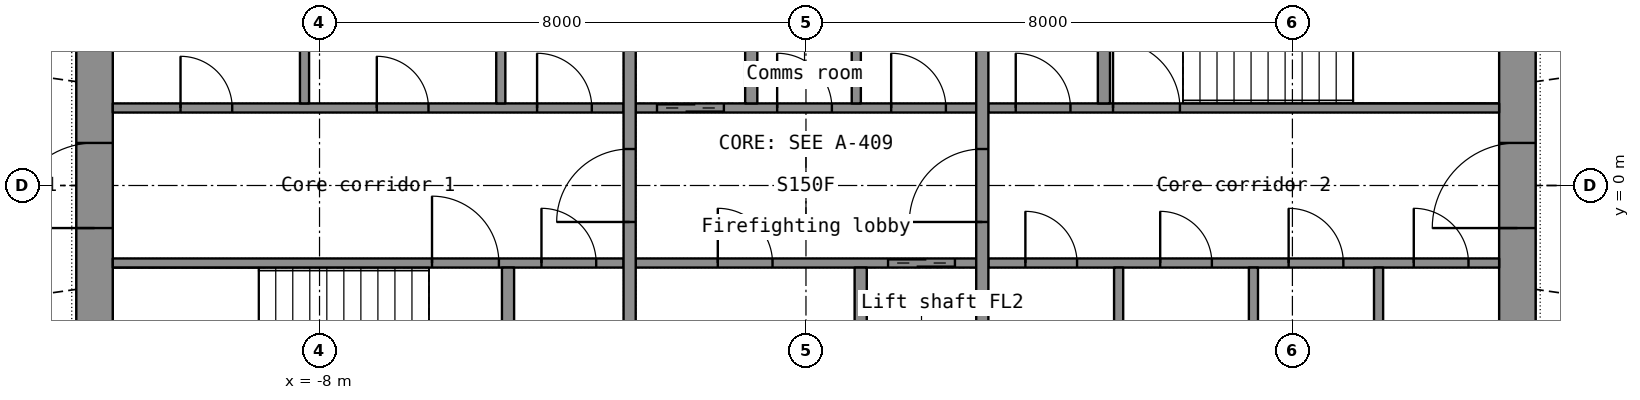
"""IFC4 building model, lengths in metres.
Left out: names, types, materials, properties, quantities, classifications, styles, units other than length and angle.
Written with IfcOpenShell. Run it as: python <this file> out.ifc"""

import sys

from ifc_helpers import new_model, si_unit, direction, frame, frame_2d, origin, place, context, subcontext, project, spatial, rectangle, extrude, element, fill, save


model = new_model("IFC4")
c1 = context("Model", 3, precision=1e-05, world=origin(), true_north=direction((0.0, 1.0)))
c2 = subcontext(c1, "Body", "Model", "MODEL_VIEW")
j1 = project(units=[si_unit("LENGTHUNIT", "METRE"), si_unit("PLANEANGLEUNIT", "RADIAN")], contexts=[c1])
p1 = place(None, origin())
s1 = spatial("IfcSite", under=j1, at=p1, CompositionType="ELEMENT")
p2 = place(p1, origin())
s2 = spatial("IfcBuilding", under=s1, at=p2, CompositionType="ELEMENT")
p3 = place(p2, frame((0.0, 0.0, 48.2)))
s3 = spatial("IfcBuildingStorey", under=s2, at=p3, CompositionType="ELEMENT", Elevation=48.2)
p4 = place(p3, frame((-11.7, -7.2, 0.0), z_axis=(0.0, 0.0, 1.0), x_axis=(0.0, 1.0, 0.0)))
e1 = element("IfcWall", 1, at=p4, inside=s3, PredefinedType="SHEAR", context=c2, shape_type="SweptSolid", body=[
    extrude(rectangle(XDim=14.4, YDim=0.6, at=frame_2d((7.2, 0.0))), origin(), (0.0, 0.0, 1.0), 3.3),
])
p5 = place(p4, frame((6.5, 0.0, 0.0)))
e2 = element("IfcOpeningElement", 2, at=p5, cuts=e1, PredefinedType="OPENING", context=c2, shape_type="SweptSolid", body=[
    extrude(rectangle(XDim=1.4, YDim=2.2, at=frame_2d((0.7, 1.1))), frame((0.0, 0.31, 0.0), z_axis=(0.0, -1.0, 0.0), x_axis=(1.0, 0.0, 0.0)), (0.0, 0.0, 1.0), 0.62),
])
p6 = place(p3, frame((11.7, -7.2, 0.0), z_axis=(0.0, 0.0, 1.0), x_axis=(0.0, 1.0, 0.0)))
e3 = element("IfcWall", 3, at=p6, inside=s3, PredefinedType="SHEAR", context=c2, shape_type="SweptSolid", body=[
    extrude(rectangle(XDim=14.4, YDim=0.6, at=frame_2d((7.2, 0.0))), origin(), (0.0, 0.0, 1.0), 3.3),
])
p7 = place(p6, frame((6.5, 0.0, 0.0)))
e4 = element("IfcOpeningElement", 4, at=p7, cuts=e3, PredefinedType="OPENING", context=c2, shape_type="SweptSolid", body=[
    extrude(rectangle(XDim=1.4, YDim=2.2, at=frame_2d((0.7, 1.1))), frame((0.0, 0.31, 0.0), z_axis=(0.0, -1.0, 0.0), x_axis=(1.0, 0.0, 0.0)), (0.0, 0.0, 1.0), 0.62),
])
p8 = place(p3, frame((-11.4, -1.275, 0.0), z_axis=(0.0, 0.0, 1.0), x_axis=(1.0, 0.0, 0.0)))
e5 = element("IfcWall", 5, at=p8, inside=s3, PredefinedType="SHEAR", context=c2, shape_type="SweptSolid", body=[
    extrude(rectangle(XDim=8.4, YDim=0.15, at=frame_2d((4.2, 0.0))), origin(), (0.0, 0.0, 1.0), 3.3),
])
p9 = place(p8, frame((5.25, 0.0, 0.0)))
e6 = element("IfcOpeningElement", 6, at=p9, cuts=e5, PredefinedType="OPENING", context=c2, shape_type="SweptSolid", body=[
    extrude(rectangle(XDim=1.1, YDim=2.15, at=frame_2d((0.55, 1.075))), frame((0.0, 0.085, 0.0), z_axis=(0.0, -1.0, 0.0), x_axis=(1.0, 0.0, 0.0)), (0.0, 0.0, 1.0), 0.17),
])
p10 = place(p8, frame((7.05, 0.0, 0.0)))
e7 = element("IfcOpeningElement", 7, at=p10, cuts=e5, PredefinedType="OPENING", context=c2, shape_type="SweptSolid", body=[
    extrude(rectangle(XDim=0.9, YDim=2.1, at=frame_2d((0.45, 1.05))), frame((0.0, 0.085, 0.0), z_axis=(0.0, -1.0, 0.0), x_axis=(1.0, 0.0, 0.0)), (0.0, 0.0, 1.0), 0.17),
])
p11 = place(p3, frame((-2.8, -1.275, 0.0), z_axis=(0.0, 0.0, 1.0), x_axis=(1.0, 0.0, 0.0)))
e8 = element("IfcWall", 8, at=p11, inside=s3, PredefinedType="SHEAR", context=c2, shape_type="SweptSolid", body=[
    extrude(rectangle(XDim=5.6, YDim=0.15, at=frame_2d((2.8, 0.0))), origin(), (0.0, 0.0, 1.0), 3.3),
])
p12 = place(p11, frame((4.15, 0.0, 0.0)))
e9 = element("IfcOpeningElement", 9, at=p12, cuts=e8, PredefinedType="OPENING", context=c2, shape_type="SweptSolid", body=[
    extrude(rectangle(XDim=1.1, YDim=2.2, at=frame_2d((0.55, 1.1))), frame((0.0, 0.085, 0.0), z_axis=(0.0, -1.0, 0.0), x_axis=(1.0, 0.0, 0.0)), (0.0, 0.0, 1.0), 0.17),
])
p13 = place(p11, frame((1.35, 0.0, 0.0)))
e10 = element("IfcOpeningElement", 10, at=p13, cuts=e8, PredefinedType="OPENING", context=c2, shape_type="SweptSolid", body=[
    extrude(rectangle(XDim=0.9, YDim=2.1, at=frame_2d((0.45, 1.05))), frame((0.0, 0.085, 0.0), z_axis=(0.0, -1.0, 0.0), x_axis=(1.0, 0.0, 0.0)), (0.0, 0.0, 1.0), 0.17),
])
p14 = place(p3, frame((3.0, -1.275, 0.0), z_axis=(0.0, 0.0, 1.0), x_axis=(1.0, 0.0, 0.0)))
e11 = element("IfcWall", 11, at=p14, inside=s3, PredefinedType="PARTITIONING", context=c2, shape_type="SweptSolid", body=[
    extrude(rectangle(XDim=8.4, YDim=0.15, at=frame_2d((4.2, 0.0))), origin(), (0.0, 0.0, 1.0), 3.3),
])
p15 = place(p14, frame((0.608, 0.0, 0.0)))
e12 = element("IfcOpeningElement", 12, at=p15, cuts=e11, PredefinedType="OPENING", context=c2, shape_type="SweptSolid", body=[
    extrude(rectangle(XDim=0.85, YDim=2.1, at=frame_2d((0.425, 1.05))), frame((0.0, 0.085, 0.0), z_axis=(0.0, -1.0, 0.0), x_axis=(1.0, 0.0, 0.0)), (0.0, 0.0, 1.0), 0.17),
])
p16 = place(p14, frame((2.825, 0.0, 0.0)))
e13 = element("IfcOpeningElement", 13, at=p16, cuts=e11, PredefinedType="OPENING", context=c2, shape_type="SweptSolid", body=[
    extrude(rectangle(XDim=0.85, YDim=2.1, at=frame_2d((0.425, 1.05))), frame((0.0, 0.085, 0.0), z_axis=(0.0, -1.0, 0.0), x_axis=(1.0, 0.0, 0.0)), (0.0, 0.0, 1.0), 0.17),
])
p17 = place(p14, frame((4.938, 0.0, 0.0)))
e14 = element("IfcOpeningElement", 14, at=p17, cuts=e11, PredefinedType="OPENING", context=c2, shape_type="SweptSolid", body=[
    extrude(rectangle(XDim=0.9, YDim=2.1, at=frame_2d((0.45, 1.05))), frame((0.0, 0.085, 0.0), z_axis=(0.0, -1.0, 0.0), x_axis=(1.0, 0.0, 0.0)), (0.0, 0.0, 1.0), 0.17),
])
p18 = place(p14, frame((6.996, 0.0, 0.0)))
e15 = element("IfcOpeningElement", 15, at=p18, cuts=e11, PredefinedType="OPENING", context=c2, shape_type="SweptSolid", body=[
    extrude(rectangle(XDim=0.9, YDim=2.1, at=frame_2d((0.45, 1.05))), frame((0.0, 0.085, 0.0), z_axis=(0.0, -1.0, 0.0), x_axis=(1.0, 0.0, 0.0)), (0.0, 0.0, 1.0), 0.17),
])
p19 = place(p3, frame((-11.4, 1.275, 0.0), z_axis=(0.0, 0.0, 1.0), x_axis=(1.0, 0.0, 0.0)))
e16 = element("IfcWall", 16, at=p19, inside=s3, PredefinedType="PARTITIONING", context=c2, shape_type="SweptSolid", body=[
    extrude(rectangle(XDim=8.4, YDim=0.15, at=frame_2d((4.2, 0.0))), origin(), (0.0, 0.0, 1.0), 3.3),
])
p20 = place(p19, frame((1.114, 0.0, 0.0)))
e17 = element("IfcOpeningElement", 17, at=p20, cuts=e16, PredefinedType="OPENING", context=c2, shape_type="SweptSolid", body=[
    extrude(rectangle(XDim=0.85, YDim=2.1, at=frame_2d((0.425, 1.05))), frame((0.0, 0.085, 0.0), z_axis=(0.0, -1.0, 0.0), x_axis=(1.0, 0.0, 0.0)), (0.0, 0.0, 1.0), 0.17),
])
p21 = place(p19, frame((4.342, 0.0, 0.0)))
e18 = element("IfcOpeningElement", 18, at=p21, cuts=e16, PredefinedType="OPENING", context=c2, shape_type="SweptSolid", body=[
    extrude(rectangle(XDim=0.85, YDim=2.1, at=frame_2d((0.425, 1.05))), frame((0.0, 0.085, 0.0), z_axis=(0.0, -1.0, 0.0), x_axis=(1.0, 0.0, 0.0)), (0.0, 0.0, 1.0), 0.17),
])
p22 = place(p19, frame((6.978, 0.0, 0.0)))
e19 = element("IfcOpeningElement", 19, at=p22, cuts=e16, PredefinedType="OPENING", context=c2, shape_type="SweptSolid", body=[
    extrude(rectangle(XDim=0.9, YDim=2.1, at=frame_2d((0.45, 1.05))), frame((0.0, 0.085, 0.0), z_axis=(0.0, -1.0, 0.0), x_axis=(1.0, 0.0, 0.0)), (0.0, 0.0, 1.0), 0.17),
])
p23 = place(p3, frame((-2.8, 1.275, 0.0), z_axis=(0.0, 0.0, 1.0), x_axis=(1.0, 0.0, 0.0)))
e20 = element("IfcWall", 20, at=p23, inside=s3, PredefinedType="SHEAR", context=c2, shape_type="SweptSolid", body=[
    extrude(rectangle(XDim=5.6, YDim=0.15, at=frame_2d((2.8, 0.0))), origin(), (0.0, 0.0, 1.0), 3.3),
])
p24 = place(p23, frame((0.35, 0.0, 0.0)))
e21 = element("IfcOpeningElement", 21, at=p24, cuts=e20, PredefinedType="OPENING", context=c2, shape_type="SweptSolid", body=[
    extrude(rectangle(XDim=1.1, YDim=2.2, at=frame_2d((0.55, 1.1))), frame((0.0, 0.085, 0.0), z_axis=(0.0, -1.0, 0.0), x_axis=(1.0, 0.0, 0.0)), (0.0, 0.0, 1.0), 0.17),
])
p25 = place(p23, frame((2.326, 0.0, 0.0)))
e22 = element("IfcOpeningElement", 22, at=p25, cuts=e20, PredefinedType="OPENING", context=c2, shape_type="SweptSolid", body=[
    extrude(rectangle(XDim=0.9, YDim=2.1, at=frame_2d((0.45, 1.05))), frame((0.0, 0.085, 0.0), z_axis=(0.0, -1.0, 0.0), x_axis=(1.0, 0.0, 0.0)), (0.0, 0.0, 1.0), 0.17),
])
p26 = place(p23, frame((4.201, 0.0, 0.0)))
e23 = element("IfcOpeningElement", 23, at=p26, cuts=e20, PredefinedType="OPENING", context=c2, shape_type="SweptSolid", body=[
    extrude(rectangle(XDim=0.9, YDim=2.1, at=frame_2d((0.45, 1.05))), frame((0.0, 0.085, 0.0), z_axis=(0.0, -1.0, 0.0), x_axis=(1.0, 0.0, 0.0)), (0.0, 0.0, 1.0), 0.17),
])
p27 = place(p3, frame((3.0, 1.275, 0.0), z_axis=(0.0, 0.0, 1.0), x_axis=(1.0, 0.0, 0.0)))
e24 = element("IfcWall", 24, at=p27, inside=s3, PredefinedType="SHEAR", context=c2, shape_type="SweptSolid", body=[
    extrude(rectangle(XDim=8.4, YDim=0.15, at=frame_2d((4.2, 0.0))), origin(), (0.0, 0.0, 1.0), 3.3),
])
p28 = place(p27, frame((2.05, 0.0, 0.0)))
e25 = element("IfcOpeningElement", 25, at=p28, cuts=e24, PredefinedType="OPENING", context=c2, shape_type="SweptSolid", body=[
    extrude(rectangle(XDim=1.1, YDim=2.15, at=frame_2d((0.55, 1.075))), frame((0.0, 0.085, 0.0), z_axis=(0.0, -1.0, 0.0), x_axis=(1.0, 0.0, 0.0)), (0.0, 0.0, 1.0), 0.17),
])
p29 = place(p27, frame((0.45, 0.0, 0.0)))
e26 = element("IfcOpeningElement", 26, at=p29, cuts=e24, PredefinedType="OPENING", context=c2, shape_type="SweptSolid", body=[
    extrude(rectangle(XDim=0.9, YDim=2.1, at=frame_2d((0.45, 1.05))), frame((0.0, 0.085, 0.0), z_axis=(0.0, -1.0, 0.0), x_axis=(1.0, 0.0, 0.0)), (0.0, 0.0, 1.0), 0.17),
])
p30 = place(p3, frame((-2.9, -3.7, 0.0), z_axis=(0.0, 0.0, 1.0), x_axis=(0.0, 1.0, 0.0)))
e27 = element("IfcWall", 27, at=p30, inside=s3, PredefinedType="SHEAR", context=c2, shape_type="SweptSolid", body=[
    extrude(rectangle(XDim=7.4, YDim=0.2, at=frame_2d((3.7, 0.0))), origin(), (0.0, 0.0, 1.0), 3.3),
])
p31 = place(p30, frame((3.1, 0.0, 0.0)))
e28 = element("IfcOpeningElement", 28, at=p31, cuts=e27, PredefinedType="OPENING", context=c2, shape_type="SweptSolid", body=[
    extrude(rectangle(XDim=1.2, YDim=2.2, at=frame_2d((0.6, 1.1))), frame((0.0, 0.11, 0.0), z_axis=(0.0, -1.0, 0.0), x_axis=(1.0, 0.0, 0.0)), (0.0, 0.0, 1.0), 0.22),
])
p32 = place(p3, frame((2.9, -3.7, 0.0), z_axis=(0.0, 0.0, 1.0), x_axis=(0.0, 1.0, 0.0)))
e29 = element("IfcWall", 29, at=p32, inside=s3, PredefinedType="SHEAR", context=c2, shape_type="SweptSolid", body=[
    extrude(rectangle(XDim=7.4, YDim=0.2, at=frame_2d((3.7, 0.0))), origin(), (0.0, 0.0, 1.0), 3.3),
])
p33 = place(p32, frame((3.1, 0.0, 0.0)))
e30 = element("IfcOpeningElement", 30, at=p33, cuts=e29, PredefinedType="OPENING", context=c2, shape_type="SweptSolid", body=[
    extrude(rectangle(XDim=1.2, YDim=2.2, at=frame_2d((0.6, 1.1))), frame((0.0, 0.11, 0.0), z_axis=(0.0, -1.0, 0.0), x_axis=(1.0, 0.0, 0.0)), (0.0, 0.0, 1.0), 0.22),
])
for number, where, z_axis, x_axis in (
    (31, (-0.9, 1.35, 0.0), (0.0, 0.0, 1.0), (0.0, 1.0, 0.0)),
    (32, (0.9, -3.7, 0.0), (0.0, 0.0, 1.0), (0.0, 1.0, 0.0)),
    (33, (-4.9, -3.7, 0.0), (0.0, 0.0, 1.0), (0.0, 1.0, 0.0)),
    (34, (4.9, 1.35, 0.0), (0.0, 0.0, 1.0), (0.0, 1.0, 0.0)),
):
    element("IfcWall", number, at=place(p3, frame(where, z_axis=z_axis, x_axis=x_axis)), inside=s3, PredefinedType="SHEAR", context=c2, shape_type="SweptSolid", body=[
        extrude(rectangle(XDim=2.35, YDim=0.2, at=frame_2d((1.175, 0.0))), origin(), (0.0, 0.0, 1.0), 3.3),
    ])
for number, where, z_axis, x_axis in (
    (35, (-8.247, 1.35, 0.0), (0.0, 0.0, 1.0), (0.0, 1.0, 0.0)),
    (36, (-5.019, 1.35, 0.0), (0.0, 0.0, 1.0), (0.0, 1.0, 0.0)),
    (37, (5.142, -3.7, 0.0), (0.0, 0.0, 1.0), (0.0, 1.0, 0.0)),
    (38, (7.359, -3.7, 0.0), (0.0, 0.0, 1.0), (0.0, 1.0, 0.0)),
    (39, (9.417, -3.7, 0.0), (0.0, 0.0, 1.0), (0.0, 1.0, 0.0)),
    (40, (0.827, 1.35, 0.0), (0.0, 0.0, 1.0), (0.0, 1.0, 0.0)),
):
    element("IfcWall", number, at=place(p3, frame(where, z_axis=z_axis, x_axis=x_axis)), inside=s3, PredefinedType="PARTITIONING", context=c2, shape_type="SweptSolid", body=[
        extrude(rectangle(XDim=2.35, YDim=0.15, at=frame_2d((1.175, 0.0))), origin(), (0.0, 0.0, 1.0), 3.3),
    ])
p34 = place(p5, origin())
e41 = element("IfcDoor", 41, at=p34, inside=s3, OperationType="DOUBLE_DOOR_SINGLE_SWING", PredefinedType="DOOR", context=c2, shape_type="SweptSolid", body=[
    extrude(rectangle(XDim=1.4, YDim=2.2, at=frame_2d((0.7, 1.1))), frame((0.0, 0.025, 0.0), z_axis=(0.0, -1.0, 0.0), x_axis=(1.0, 0.0, 0.0)), (0.0, 0.0, 1.0), 0.05),
])
fill(e2, e41)
p35 = place(p7, origin())
e42 = element("IfcDoor", 42, at=p35, inside=s3, OperationType="DOUBLE_DOOR_SINGLE_SWING", PredefinedType="DOOR", context=c2, shape_type="SweptSolid", body=[
    extrude(rectangle(XDim=1.4, YDim=2.2, at=frame_2d((0.7, 1.1))), frame((0.0, 0.025, 0.0), z_axis=(0.0, -1.0, 0.0), x_axis=(1.0, 0.0, 0.0)), (0.0, 0.0, 1.0), 0.05),
])
fill(e4, e42)
p36 = place(p31, origin())
e43 = element("IfcDoor", 43, at=p36, inside=s3, OperationType="SINGLE_SWING_LEFT", PredefinedType="DOOR", context=c2, shape_type="SweptSolid", body=[
    extrude(rectangle(XDim=1.2, YDim=2.2, at=frame_2d((0.6, 1.1))), frame((0.0, 0.025, 0.0), z_axis=(0.0, -1.0, 0.0), x_axis=(1.0, 0.0, 0.0)), (0.0, 0.0, 1.0), 0.05),
])
fill(e28, e43)
p37 = place(p33, origin())
e44 = element("IfcDoor", 44, at=p37, inside=s3, OperationType="SINGLE_SWING_LEFT", PredefinedType="DOOR", context=c2, shape_type="SweptSolid", body=[
    extrude(rectangle(XDim=1.2, YDim=2.2, at=frame_2d((0.6, 1.1))), frame((0.0, 0.025, 0.0), z_axis=(0.0, -1.0, 0.0), x_axis=(1.0, 0.0, 0.0)), (0.0, 0.0, 1.0), 0.05),
])
fill(e30, e44)
p38 = place(p24, origin())
e45 = element("IfcDoor", 45, at=p38, inside=s3, OperationType="DOUBLE_DOOR_SLIDING", PredefinedType="DOOR", context=c2, shape_type="SweptSolid", body=[
    extrude(rectangle(XDim=1.1, YDim=2.2, at=frame_2d((0.55, 1.1))), frame((0.0, 0.025, 0.0), z_axis=(0.0, -1.0, 0.0), x_axis=(1.0, 0.0, 0.0)), (0.0, 0.0, 1.0), 0.05),
])
fill(e21, e45)
p39 = place(p12, origin())
e46 = element("IfcDoor", 46, at=p39, inside=s3, OperationType="DOUBLE_DOOR_SLIDING", PredefinedType="DOOR", context=c2, shape_type="SweptSolid", body=[
    extrude(rectangle(XDim=1.1, YDim=2.2, at=frame_2d((0.55, 1.1))), frame((0.0, 0.025, 0.0), z_axis=(0.0, -1.0, 0.0), x_axis=(1.0, 0.0, 0.0)), (0.0, 0.0, 1.0), 0.05),
])
fill(e9, e46)
p40 = place(p9, origin())
e47 = element("IfcDoor", 47, at=p40, inside=s3, OperationType="SINGLE_SWING_LEFT", PredefinedType="DOOR", context=c2, shape_type="SweptSolid", body=[
    extrude(rectangle(XDim=1.1, YDim=2.15, at=frame_2d((0.55, 1.075))), frame((0.0, 0.025, 0.0), z_axis=(0.0, -1.0, 0.0), x_axis=(1.0, 0.0, 0.0)), (0.0, 0.0, 1.0), 0.05),
])
fill(e6, e47)
p41 = place(p28, origin())
e48 = element("IfcDoor", 48, at=p41, inside=s3, OperationType="SINGLE_SWING_LEFT", PredefinedType="DOOR", context=c2, shape_type="SweptSolid", body=[
    extrude(rectangle(XDim=1.1, YDim=2.15, at=frame_2d((0.55, 1.075))), frame((0.0, 0.025, 0.0), z_axis=(0.0, -1.0, 0.0), x_axis=(1.0, 0.0, 0.0)), (0.0, 0.0, 1.0), 0.05),
])
fill(e25, e48)
p42 = place(p20, origin())
e49 = element("IfcDoor", 49, at=p42, inside=s3, OperationType="SINGLE_SWING_LEFT", PredefinedType="DOOR", context=c2, shape_type="SweptSolid", body=[
    extrude(rectangle(XDim=0.85, YDim=2.1, at=frame_2d((0.425, 1.05))), frame((0.0, 0.025, 0.0), z_axis=(0.0, -1.0, 0.0), x_axis=(1.0, 0.0, 0.0)), (0.0, 0.0, 1.0), 0.05),
])
fill(e17, e49)
p43 = place(p21, origin())
e50 = element("IfcDoor", 50, at=p43, inside=s3, OperationType="SINGLE_SWING_LEFT", PredefinedType="DOOR", context=c2, shape_type="SweptSolid", body=[
    extrude(rectangle(XDim=0.85, YDim=2.1, at=frame_2d((0.425, 1.05))), frame((0.0, 0.025, 0.0), z_axis=(0.0, -1.0, 0.0), x_axis=(1.0, 0.0, 0.0)), (0.0, 0.0, 1.0), 0.05),
])
fill(e18, e50)
p44 = place(p22, origin())
e51 = element("IfcDoor", 51, at=p44, inside=s3, OperationType="SINGLE_SWING_LEFT", PredefinedType="DOOR", context=c2, shape_type="SweptSolid", body=[
    extrude(rectangle(XDim=0.9, YDim=2.1, at=frame_2d((0.45, 1.05))), frame((0.0, 0.025, 0.0), z_axis=(0.0, -1.0, 0.0), x_axis=(1.0, 0.0, 0.0)), (0.0, 0.0, 1.0), 0.05),
])
fill(e19, e51)
p45 = place(p15, origin())
e52 = element("IfcDoor", 52, at=p45, inside=s3, OperationType="SINGLE_SWING_LEFT", PredefinedType="DOOR", context=c2, shape_type="SweptSolid", body=[
    extrude(rectangle(XDim=0.85, YDim=2.1, at=frame_2d((0.425, 1.05))), frame((0.0, 0.025, 0.0), z_axis=(0.0, -1.0, 0.0), x_axis=(1.0, 0.0, 0.0)), (0.0, 0.0, 1.0), 0.05),
])
fill(e12, e52)
p46 = place(p16, origin())
e53 = element("IfcDoor", 53, at=p46, inside=s3, OperationType="SINGLE_SWING_LEFT", PredefinedType="DOOR", context=c2, shape_type="SweptSolid", body=[
    extrude(rectangle(XDim=0.85, YDim=2.1, at=frame_2d((0.425, 1.05))), frame((0.0, 0.025, 0.0), z_axis=(0.0, -1.0, 0.0), x_axis=(1.0, 0.0, 0.0)), (0.0, 0.0, 1.0), 0.05),
])
fill(e13, e53)
p47 = place(p17, origin())
e54 = element("IfcDoor", 54, at=p47, inside=s3, OperationType="SINGLE_SWING_LEFT", PredefinedType="DOOR", context=c2, shape_type="SweptSolid", body=[
    extrude(rectangle(XDim=0.9, YDim=2.1, at=frame_2d((0.45, 1.05))), frame((0.0, 0.025, 0.0), z_axis=(0.0, -1.0, 0.0), x_axis=(1.0, 0.0, 0.0)), (0.0, 0.0, 1.0), 0.05),
])
fill(e14, e54)
p48 = place(p18, origin())
e55 = element("IfcDoor", 55, at=p48, inside=s3, OperationType="SINGLE_SWING_LEFT", PredefinedType="DOOR", context=c2, shape_type="SweptSolid", body=[
    extrude(rectangle(XDim=0.9, YDim=2.1, at=frame_2d((0.45, 1.05))), frame((0.0, 0.025, 0.0), z_axis=(0.0, -1.0, 0.0), x_axis=(1.0, 0.0, 0.0)), (0.0, 0.0, 1.0), 0.05),
])
fill(e15, e55)
p49 = place(p25, origin())
e56 = element("IfcDoor", 56, at=p49, inside=s3, OperationType="SINGLE_SWING_LEFT", PredefinedType="DOOR", context=c2, shape_type="SweptSolid", body=[
    extrude(rectangle(XDim=0.9, YDim=2.1, at=frame_2d((0.45, 1.05))), frame((0.0, 0.025, 0.0), z_axis=(0.0, -1.0, 0.0), x_axis=(1.0, 0.0, 0.0)), (0.0, 0.0, 1.0), 0.05),
])
fill(e22, e56)
p50 = place(p26, origin())
e57 = element("IfcDoor", 57, at=p50, inside=s3, OperationType="SINGLE_SWING_LEFT", PredefinedType="DOOR", context=c2, shape_type="SweptSolid", body=[
    extrude(rectangle(XDim=0.9, YDim=2.1, at=frame_2d((0.45, 1.05))), frame((0.0, 0.025, 0.0), z_axis=(0.0, -1.0, 0.0), x_axis=(1.0, 0.0, 0.0)), (0.0, 0.0, 1.0), 0.05),
])
fill(e23, e57)
p51 = place(p13, origin())
e58 = element("IfcDoor", 58, at=p51, inside=s3, OperationType="SINGLE_SWING_LEFT", PredefinedType="DOOR", context=c2, shape_type="SweptSolid", body=[
    extrude(rectangle(XDim=0.9, YDim=2.1, at=frame_2d((0.45, 1.05))), frame((0.0, 0.025, 0.0), z_axis=(0.0, -1.0, 0.0), x_axis=(1.0, 0.0, 0.0)), (0.0, 0.0, 1.0), 0.05),
])
fill(e10, e58)
p52 = place(p29, origin())
e59 = element("IfcDoor", 59, at=p52, inside=s3, OperationType="SINGLE_SWING_LEFT", PredefinedType="DOOR", context=c2, shape_type="SweptSolid", body=[
    extrude(rectangle(XDim=0.9, YDim=2.1, at=frame_2d((0.45, 1.05))), frame((0.0, 0.025, 0.0), z_axis=(0.0, -1.0, 0.0), x_axis=(1.0, 0.0, 0.0)), (0.0, 0.0, 1.0), 0.05),
])
fill(e26, e59)
p53 = place(p10, origin())
e60 = element("IfcDoor", 60, at=p53, inside=s3, OperationType="SINGLE_SWING_LEFT", PredefinedType="DOOR", context=c2, shape_type="SweptSolid", body=[
    extrude(rectangle(XDim=0.9, YDim=2.1, at=frame_2d((0.45, 1.05))), frame((0.0, 0.025, 0.0), z_axis=(0.0, -1.0, 0.0), x_axis=(1.0, 0.0, 0.0)), (0.0, 0.0, 1.0), 0.05),
])
fill(e7, e60)
save(model, sys.argv[1])
